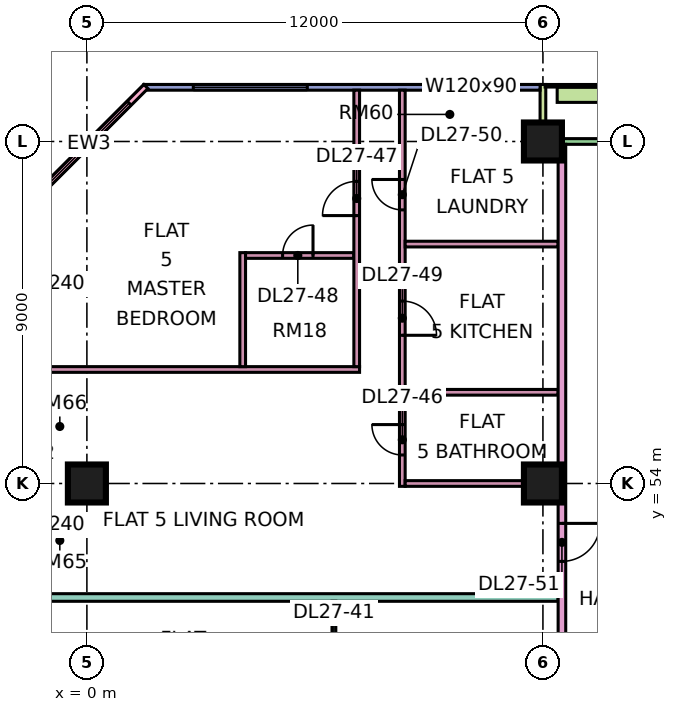
"""IFC4 building model, lengths in metres.
Left out: names, types, materials, properties, quantities, classifications, styles, units other than length and angle.
Written with IfcOpenShell. Run it as: python <this file> out.ifc"""

import sys

from ifc_helpers import new_model, si_unit, direction, frame, frame_2d, origin, origin_2d, place, context, subcontext, project, spatial, rectangle, extrude, element, fill, save


model = new_model("IFC4")
c1 = context("Model", 3, precision=1e-05, world=origin(), true_north=direction((0.0, 1.0)))
c2 = subcontext(c1, "Body", "Model", "MODEL_VIEW")
j1 = project(units=[si_unit("LENGTHUNIT", "METRE"), si_unit("PLANEANGLEUNIT", "RADIAN")], contexts=[c1])
p1 = place(None, origin())
s1 = spatial("IfcSite", under=j1, at=p1, CompositionType="ELEMENT")
p2 = place(p1, origin())
s2 = spatial("IfcBuilding", under=s1, at=p2, CompositionType="ELEMENT")
p3 = place(p2, frame((0.0, 0.0, 118.15)))
s3 = spatial("IfcBuildingStorey", under=s2, at=p3, CompositionType="ELEMENT", Elevation=118.15)
for number, where, z_axis, x_axis in (
    (1, (0.0, 54.0, 0.0), (0.0, 0.0, 1.0), (1.0, 0.0, 0.0)),
    (2, (12.0, 54.0, 0.0), (0.0, 0.0, 1.0), (1.0, 0.0, 0.0)),
    (3, (12.0, 63.0, 0.0), (0.0, 0.0, 1.0), (1.0, 0.0, 0.0)),
):
    element("IfcColumn", number, at=place(p3, frame(where, z_axis=z_axis, x_axis=x_axis)), inside=s3, PredefinedType="COLUMN", context=c2, shape_type="SweptSolid", body=[
        extrude(rectangle(XDim=1.0, YDim=1.0, at=origin_2d()), origin(), (0.0, 0.0, 1.0), 3.75),
    ])
p4 = place(p3, frame((22.425, 63.0, 0.0), z_axis=(0.0, 0.0, 1.0), x_axis=(-1.0, 0.0, 0.0)))
e4 = element("IfcWall", 4, at=p4, inside=s3, PredefinedType="SOLIDWALL", context=c2, shape_type="SweptSolid", body=[
    extrude(rectangle(XDim=10.35, YDim=0.15, at=frame_2d((5.175, 0.0))), origin(), (0.0, 0.0, 1.0), 3.35),
])
p5 = place(p4, frame((0.562, 0.0, 0.45)))
e5 = element("IfcOpeningElement", 5, at=p5, cuts=e4, PredefinedType="OPENING", context=c2, shape_type="SweptSolid", body=[
    extrude(rectangle(XDim=1.8, YDim=2.4, at=frame_2d((0.9, 1.2))), frame((0.0, 0.085, 0.0), z_axis=(0.0, -1.0, 0.0), x_axis=(1.0, 0.0, 0.0)), (0.0, 0.0, 1.0), 0.17),
])
p6 = place(p4, frame((3.975, 0.0, 0.0)))
e6 = element("IfcOpeningElement", 6, at=p6, cuts=e4, PredefinedType="OPENING", context=c2, shape_type="SweptSolid", body=[
    extrude(rectangle(XDim=1.8, YDim=2.4, at=frame_2d((0.9, 1.2))), frame((0.0, 0.085, 0.0), z_axis=(0.0, -1.0, 0.0), x_axis=(1.0, 0.0, 0.0)), (0.0, 0.0, 1.0), 0.17),
])
p7 = place(p3, frame((12.0, 64.5, 0.0), z_axis=(0.0, 0.0, 1.0), x_axis=(0.0, -1.0, 0.0)))
e7 = element("IfcWall", 7, at=p7, inside=s3, PredefinedType="SOLIDWALL", context=c2, shape_type="SweptSolid", body=[
    extrude(rectangle(XDim=1.5, YDim=0.15, at=frame_2d((0.75, 0.0))), origin(), (0.0, 0.0, 1.0), 3.35),
])
p8 = place(p3, frame((11.925, 64.425, 0.0), z_axis=(0.0, 0.0, 1.0), x_axis=(-1.0, 0.0, 0.0)))
e8 = element("IfcWall", 8, at=p8, inside=s3, PredefinedType="SOLIDWALL", context=c2, shape_type="SweptSolid", body=[
    extrude(rectangle(XDim=10.425, YDim=0.15, at=frame_2d((5.212, 0.0))), origin(), (0.0, 0.0, 1.0), 3.35),
])
p9 = place(p8, frame((1.212, 0.0, 1.7)))
e9 = element("IfcOpeningElement", 9, at=p9, cuts=e8, PredefinedType="OPENING", context=c2, shape_type="SweptSolid", body=[
    extrude(rectangle(XDim=1.2, YDim=0.9, at=frame_2d((0.6, 0.45))), frame((0.0, 0.085, 0.0), z_axis=(0.0, -1.0, 0.0), x_axis=(1.0, 0.0, 0.0)), (0.0, 0.0, 1.0), 0.17),
])
p10 = place(p8, frame((6.125, 0.0, 0.45)))
e10 = element("IfcOpeningElement", 10, at=p10, cuts=e8, PredefinedType="OPENING", context=c2, shape_type="SweptSolid", body=[
    extrude(rectangle(XDim=3.0, YDim=2.4, at=frame_2d((1.5, 1.2))), frame((0.0, 0.085, 0.0), z_axis=(0.0, -1.0, 0.0), x_axis=(1.0, 0.0, 0.0)), (0.0, 0.0, 1.0), 0.17),
])
p11 = place(p3, frame((1.553, 64.447, 0.0), z_axis=(0.0, 0.0, 1.0), x_axis=(-0.707106781187, -0.707106781187, 0.0)))
e11 = element("IfcWall", 11, at=p11, inside=s3, PredefinedType="SOLIDWALL", context=c2, shape_type="SweptSolid", body=[
    extrude(rectangle(XDim=4.243, YDim=0.15, at=frame_2d((2.121, 0.0))), origin(), (0.0, 0.0, 1.0), 3.35),
])
p12 = place(p11, frame((0.621, 0.0, 0.45)))
e12 = element("IfcOpeningElement", 12, at=p12, cuts=e11, PredefinedType="OPENING", context=c2, shape_type="SweptSolid", body=[
    extrude(rectangle(XDim=3.0, YDim=2.4, at=frame_2d((1.5, 1.2))), frame((0.0, 0.085, 0.0), z_axis=(0.0, -1.0, 0.0), x_axis=(1.0, 0.0, 0.0)), (0.0, 0.0, 1.0), 0.17),
])
p13 = place(p3, frame((22.125, 64.229, 0.0), z_axis=(0.0, 0.0, 1.0), x_axis=(-1.0, 0.0, 0.0)))
e13 = element("IfcWall", 13, at=p13, inside=s3, PredefinedType="SOLIDWALL", context=c2, shape_type="SweptSolid", body=[
    extrude(rectangle(XDim=9.75, YDim=0.4, at=frame_2d((4.875, 0.0))), origin(), (0.0, 0.0, 1.0), 0.7),
])
p14 = place(p3, frame((-1.35, 51.0, 0.0), z_axis=(0.0, 0.0, 1.0), x_axis=(1.0, 0.0, 0.0)))
e14 = element("IfcWall", 14, at=p14, inside=s3, PredefinedType="PARTITIONING", context=c2, shape_type="SweptSolid", body=[
    extrude(rectangle(XDim=13.75, YDim=0.2, at=frame_2d((6.875, 0.0))), origin(), (0.0, 0.0, 1.0), 3.35),
])
p15 = place(p3, frame((-1.35, 57.0, 0.0), z_axis=(0.0, 0.0, 1.0), x_axis=(1.0, 0.0, 0.0)))
e15 = element("IfcWall", 15, at=p15, inside=s3, PredefinedType="PARTITIONING", context=c2, shape_type="SweptSolid", body=[
    extrude(rectangle(XDim=8.525, YDim=0.15, at=frame_2d((4.263, 0.0))), origin(), (0.0, 0.0, 1.0), 3.35),
])
p16 = place(p3, frame((4.1, 57.075, 0.0), z_axis=(0.0, 0.0, 1.0), x_axis=(0.0, 1.0, 0.0)))
e16 = element("IfcWall", 16, at=p16, inside=s3, PredefinedType="PARTITIONING", context=c2, shape_type="SweptSolid", body=[
    extrude(rectangle(XDim=3.0, YDim=0.15, at=frame_2d((1.5, 0.0))), origin(), (0.0, 0.0, 1.0), 3.35),
])
p17 = place(p3, frame((4.175, 60.0, 0.0), z_axis=(0.0, 0.0, 1.0), x_axis=(1.0, 0.0, 0.0)))
e17 = element("IfcWall", 17, at=p17, inside=s3, PredefinedType="PARTITIONING", context=c2, shape_type="SweptSolid", body=[
    extrude(rectangle(XDim=2.85, YDim=0.15, at=frame_2d((1.425, 0.0))), origin(), (0.0, 0.0, 1.0), 3.35),
])
p18 = place(p17, frame((0.975, 0.0, 0.0)))
e18 = element("IfcOpeningElement", 18, at=p18, cuts=e17, PredefinedType="OPENING", context=c2, shape_type="SweptSolid", body=[
    extrude(rectangle(XDim=0.8, YDim=2.1, at=frame_2d((0.4, 1.05))), frame((0.0, 0.085, 0.0), z_axis=(0.0, -1.0, 0.0), x_axis=(1.0, 0.0, 0.0)), (0.0, 0.0, 1.0), 0.17),
])
p19 = place(p3, frame((6.5, 41.95, 0.0), z_axis=(0.0, 0.0, 1.0), x_axis=(0.0, 1.0, 0.0)))
e19 = element("IfcWall", 19, at=p19, inside=s3, PredefinedType="PARTITIONING", context=c2, shape_type="SweptSolid", body=[
    extrude(rectangle(XDim=8.95, YDim=0.1, at=frame_2d((4.475, 0.0))), origin(), (0.0, 0.0, 1.0), 3.35),
])
p20 = place(p19, frame((1.1, 0.0, 0.0)))
e20 = element("IfcOpeningElement", 20, at=p20, cuts=e19, PredefinedType="OPENING", context=c2, shape_type="SweptSolid", body=[
    extrude(rectangle(XDim=0.9, YDim=2.1, at=frame_2d((0.45, 1.05))), frame((0.0, 0.06, 0.0), z_axis=(0.0, -1.0, 0.0), x_axis=(1.0, 0.0, 0.0)), (0.0, 0.0, 1.0), 0.12),
])
p21 = place(p19, frame((7.1, 0.0, 0.0)))
e21 = element("IfcOpeningElement", 21, at=p21, cuts=e19, PredefinedType="OPENING", context=c2, shape_type="SweptSolid", body=[
    extrude(rectangle(XDim=0.9, YDim=2.1, at=frame_2d((0.45, 1.05))), frame((0.0, 0.06, 0.0), z_axis=(0.0, -1.0, 0.0), x_axis=(1.0, 0.0, 0.0)), (0.0, 0.0, 1.0), 0.12),
])
p22 = place(p19, frame((4.1, 0.0, 0.0)))
e22 = element("IfcOpeningElement", 22, at=p22, cuts=e19, PredefinedType="OPENING", context=c2, shape_type="SweptSolid", body=[
    extrude(rectangle(XDim=0.9, YDim=2.1, at=frame_2d((0.45, 1.05))), frame((0.0, 0.06, 0.0), z_axis=(0.0, -1.0, 0.0), x_axis=(1.0, 0.0, 0.0)), (0.0, 0.0, 1.0), 0.12),
])
p23 = place(p3, frame((7.1, 57.075, 0.0), z_axis=(0.0, 0.0, 1.0), x_axis=(0.0, 1.0, 0.0)))
e23 = element("IfcWall", 23, at=p23, inside=s3, PredefinedType="PARTITIONING", context=c2, shape_type="SweptSolid", body=[
    extrude(rectangle(XDim=7.275, YDim=0.15, at=frame_2d((3.638, 0.0))), origin(), (0.0, 0.0, 1.0), 3.35),
])
p24 = place(p23, frame((3.975, 0.0, 0.0)))
e24 = element("IfcOpeningElement", 24, at=p24, cuts=e23, PredefinedType="OPENING", context=c2, shape_type="SweptSolid", body=[
    extrude(rectangle(XDim=0.9, YDim=2.1, at=frame_2d((0.45, 1.05))), frame((0.0, 0.085, 0.0), z_axis=(0.0, -1.0, 0.0), x_axis=(1.0, 0.0, 0.0)), (0.0, 0.0, 1.0), 0.17),
])
p25 = place(p3, frame((8.3, 53.925, 0.0), z_axis=(0.0, 0.0, 1.0), x_axis=(0.0, 1.0, 0.0)))
e25 = element("IfcWall", 25, at=p25, inside=s3, PredefinedType="PARTITIONING", context=c2, shape_type="SweptSolid", body=[
    extrude(rectangle(XDim=10.425, YDim=0.15, at=frame_2d((5.212, 0.0))), origin(), (0.0, 0.0, 1.0), 3.35),
])
p26 = place(p25, frame((0.825, 0.0, 0.0)))
e26 = element("IfcOpeningElement", 26, at=p26, cuts=e25, PredefinedType="OPENING", context=c2, shape_type="SweptSolid", body=[
    extrude(rectangle(XDim=0.8, YDim=2.1, at=frame_2d((0.4, 1.05))), frame((0.0, 0.085, 0.0), z_axis=(0.0, -1.0, 0.0), x_axis=(1.0, 0.0, 0.0)), (0.0, 0.0, 1.0), 0.17),
])
p27 = place(p25, frame((3.975, 0.0, 0.0)))
e27 = element("IfcOpeningElement", 27, at=p27, cuts=e25, PredefinedType="OPENING", context=c2, shape_type="SweptSolid", body=[
    extrude(rectangle(XDim=0.9, YDim=2.1, at=frame_2d((0.45, 1.05))), frame((0.0, 0.085, 0.0), z_axis=(0.0, -1.0, 0.0), x_axis=(1.0, 0.0, 0.0)), (0.0, 0.0, 1.0), 0.17),
])
p28 = place(p25, frame((7.275, 0.0, 0.0)))
e28 = element("IfcOpeningElement", 28, at=p28, cuts=e25, PredefinedType="OPENING", context=c2, shape_type="SweptSolid", body=[
    extrude(rectangle(XDim=0.8, YDim=2.1, at=frame_2d((0.4, 1.05))), frame((0.0, 0.085, 0.0), z_axis=(0.0, -1.0, 0.0), x_axis=(1.0, 0.0, 0.0)), (0.0, 0.0, 1.0), 0.17),
])
for number, where, z_axis, x_axis in (
    (29, (8.375, 54.0, 0.0), (0.0, 0.0, 1.0), (1.0, 0.0, 0.0)),
    (30, (8.375, 56.4, 0.0), (0.0, 0.0, 1.0), (1.0, 0.0, 0.0)),
    (31, (8.375, 60.3, 0.0), (0.0, 0.0, 1.0), (1.0, 0.0, 0.0)),
):
    element("IfcWall", number, at=place(p3, frame(where, z_axis=z_axis, x_axis=x_axis)), inside=s3, PredefinedType="PARTITIONING", context=c2, shape_type="SweptSolid", body=[
        extrude(rectangle(XDim=4.025, YDim=0.15, at=frame_2d((2.012, 0.0))), origin(), (0.0, 0.0, 1.0), 3.35),
    ])
p29 = place(p3, frame((12.5, 20.0, 0.0), z_axis=(0.0, 0.0, 1.0), x_axis=(0.0, 1.0, 0.0)))
e32 = element("IfcWall", 32, at=p29, inside=s3, PredefinedType="PARTITIONING", context=c2, shape_type="SweptSolid", body=[
    extrude(rectangle(XDim=42.926, YDim=0.2, at=frame_2d((21.463, 0.0))), origin(), (0.0, 0.0, 1.0), 3.35),
])
p30 = place(p29, frame((28.65, 0.0, 0.0)))
e33 = element("IfcOpeningElement", 33, at=p30, cuts=e32, PredefinedType="OPENING", context=c2, shape_type="SweptSolid", body=[
    extrude(rectangle(XDim=1.0, YDim=2.1, at=frame_2d((0.5, 1.05))), frame((0.0, 0.11, 0.0), z_axis=(0.0, -1.0, 0.0), x_axis=(1.0, 0.0, 0.0)), (0.0, 0.0, 1.0), 0.22),
])
p31 = place(p29, frame((31.95, 0.0, 0.0)))
e34 = element("IfcOpeningElement", 34, at=p31, cuts=e32, PredefinedType="OPENING", context=c2, shape_type="SweptSolid", body=[
    extrude(rectangle(XDim=1.0, YDim=2.1, at=frame_2d((0.5, 1.05))), frame((0.0, 0.11, 0.0), z_axis=(0.0, -1.0, 0.0), x_axis=(1.0, 0.0, 0.0)), (0.0, 0.0, 1.0), 0.22),
])
p32 = place(p29, frame((0.6, 0.0, 0.0)))
e35 = element("IfcOpeningElement", 35, at=p32, cuts=e32, PredefinedType="OPENING", context=c2, shape_type="SweptSolid", body=[
    extrude(rectangle(XDim=1.2, YDim=2.1, at=frame_2d((0.6, 1.05))), frame((0.0, 0.11, 0.0), z_axis=(0.0, -1.0, 0.0), x_axis=(1.0, 0.0, 0.0)), (0.0, 0.0, 1.0), 0.22),
])
p33 = place(p29, frame((4.65, 0.0, 0.0)))
e36 = element("IfcOpeningElement", 36, at=p33, cuts=e32, PredefinedType="OPENING", context=c2, shape_type="SweptSolid", body=[
    extrude(rectangle(XDim=1.0, YDim=2.1, at=frame_2d((0.5, 1.05))), frame((0.0, 0.11, 0.0), z_axis=(0.0, -1.0, 0.0), x_axis=(1.0, 0.0, 0.0)), (0.0, 0.0, 1.0), 0.22),
])
p34 = place(p9, origin())
e37 = element("IfcWindow", 37, at=p34, inside=s3, PartitioningType="SINGLE_PANEL", PredefinedType="WINDOW", context=c2, shape_type="SweptSolid", body=[
    extrude(rectangle(XDim=1.2, YDim=0.9, at=frame_2d((0.6, 0.45))), frame((0.0, 0.03, 0.0), z_axis=(0.0, -1.0, 0.0), x_axis=(1.0, 0.0, 0.0)), (0.0, 0.0, 1.0), 0.06),
])
fill(e9, e37)
p35 = place(p10, origin())
e38 = element("IfcWindow", 38, at=p35, inside=s3, PartitioningType="SINGLE_PANEL", PredefinedType="WINDOW", context=c2, shape_type="SweptSolid", body=[
    extrude(rectangle(XDim=3.0, YDim=2.4, at=frame_2d((1.5, 1.2))), frame((0.0, 0.03, 0.0), z_axis=(0.0, -1.0, 0.0), x_axis=(1.0, 0.0, 0.0)), (0.0, 0.0, 1.0), 0.06),
])
fill(e10, e38)
p36 = place(p12, origin())
e39 = element("IfcWindow", 39, at=p36, inside=s3, PartitioningType="SINGLE_PANEL", PredefinedType="WINDOW", context=c2, shape_type="SweptSolid", body=[
    extrude(rectangle(XDim=3.0, YDim=2.4, at=frame_2d((1.5, 1.2))), frame((0.0, 0.03, 0.0), z_axis=(0.0, -1.0, 0.0), x_axis=(1.0, 0.0, 0.0)), (0.0, 0.0, 1.0), 0.06),
])
fill(e12, e39)
p37 = place(p26, frame((0.8, 0.0, 0.0), z_axis=(0.0, 0.0, 1.0), x_axis=(-1.0, 0.0, 0.0)))
e40 = element("IfcDoor", 40, at=p37, inside=s3, OperationType="SINGLE_SWING_RIGHT", PredefinedType="DOOR", context=c2, shape_type="SweptSolid", body=[
    extrude(rectangle(XDim=0.8, YDim=2.1, at=frame_2d((0.4, 1.05))), frame((0.0, 0.025, 0.0), z_axis=(0.0, -1.0, 0.0), x_axis=(1.0, 0.0, 0.0)), (0.0, 0.0, 1.0), 0.05),
])
fill(e26, e40)
p38 = place(p24, origin())
e41 = element("IfcDoor", 41, at=p38, inside=s3, OperationType="SINGLE_SWING_LEFT", PredefinedType="DOOR", context=c2, shape_type="SweptSolid", body=[
    extrude(rectangle(XDim=0.9, YDim=2.1, at=frame_2d((0.45, 1.05))), frame((0.0, 0.025, 0.0), z_axis=(0.0, -1.0, 0.0), x_axis=(1.0, 0.0, 0.0)), (0.0, 0.0, 1.0), 0.05),
])
fill(e24, e41)
p39 = place(p18, frame((0.8, 0.0, 0.0), z_axis=(0.0, 0.0, 1.0), x_axis=(-1.0, 0.0, 0.0)))
e42 = element("IfcDoor", 42, at=p39, inside=s3, OperationType="SINGLE_SWING_RIGHT", PredefinedType="DOOR", context=c2, shape_type="SweptSolid", body=[
    extrude(rectangle(XDim=0.8, YDim=2.1, at=frame_2d((0.4, 1.05))), frame((0.0, 0.025, 0.0), z_axis=(0.0, -1.0, 0.0), x_axis=(1.0, 0.0, 0.0)), (0.0, 0.0, 1.0), 0.05),
])
fill(e18, e42)
p40 = place(p27, frame((0.9, 0.0, 0.0), z_axis=(0.0, 0.0, 1.0), x_axis=(-1.0, 0.0, 0.0)))
e43 = element("IfcDoor", 43, at=p40, inside=s3, OperationType="SINGLE_SWING_LEFT", PredefinedType="DOOR", context=c2, shape_type="SweptSolid", body=[
    extrude(rectangle(XDim=0.9, YDim=2.1, at=frame_2d((0.45, 1.05))), frame((0.0, 0.025, 0.0), z_axis=(0.0, -1.0, 0.0), x_axis=(1.0, 0.0, 0.0)), (0.0, 0.0, 1.0), 0.05),
])
fill(e27, e43)
p41 = place(p28, frame((0.8, 0.0, 0.0), z_axis=(0.0, 0.0, 1.0), x_axis=(-1.0, 0.0, 0.0)))
e44 = element("IfcDoor", 44, at=p41, inside=s3, OperationType="SINGLE_SWING_RIGHT", PredefinedType="DOOR", context=c2, shape_type="SweptSolid", body=[
    extrude(rectangle(XDim=0.8, YDim=2.1, at=frame_2d((0.4, 1.05))), frame((0.0, 0.025, 0.0), z_axis=(0.0, -1.0, 0.0), x_axis=(1.0, 0.0, 0.0)), (0.0, 0.0, 1.0), 0.05),
])
fill(e28, e44)
p42 = place(p31, origin())
e45 = element("IfcDoor", 45, at=p42, inside=s3, OperationType="SINGLE_SWING_RIGHT", PredefinedType="DOOR", context=c2, shape_type="SweptSolid", body=[
    extrude(rectangle(XDim=1.0, YDim=2.1, at=frame_2d((0.5, 1.05))), frame((0.0, 0.025, 0.0), z_axis=(0.0, -1.0, 0.0), x_axis=(1.0, 0.0, 0.0)), (0.0, 0.0, 1.0), 0.05),
])
fill(e34, e45)
save(model, sys.argv[1])
